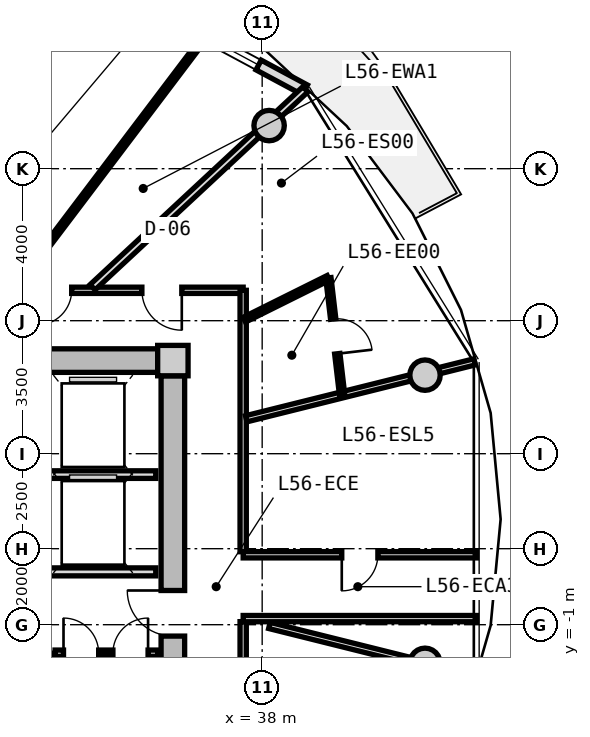
"""IFC4 building model, lengths in metres.
Left out: names, types, materials, properties, quantities, classifications, styles, units other than length and angle.
Written with IfcOpenShell. Run it as: python <this file> out.ifc"""

import sys

from ifc_helpers import new_model, si_unit, direction, frame, frame_2d, origin, origin_2d, place, context, subcontext, project, spatial, rectangle, circle, extrude, source, transform, mapped, element, fill, save


model = new_model("IFC4")
c1 = context("Model", 3, precision=1e-05, world=origin(), true_north=direction((0.0, 1.0)))
c2 = subcontext(c1, "Body", "Model", "MODEL_VIEW")
j1 = project(units=[si_unit("LENGTHUNIT", "METRE"), si_unit("PLANEANGLEUNIT", "RADIAN")], contexts=[c1])
p1 = place(None, origin())
s1 = spatial("IfcSite", under=j1, at=p1, CompositionType="ELEMENT")
p2 = place(p1, origin())
s2 = spatial("IfcBuilding", under=s1, at=p2, CompositionType="ELEMENT")
p3 = place(p2, frame((0.0, 0.0, 180.05)))
s3 = spatial("IfcBuildingStorey", under=s2, at=p3, CompositionType="ELEMENT", Elevation=180.05)
m1 = source(origin(), c2, "Body", "SweptSolid", [
    extrude(rectangle(XDim=0.8, YDim=0.8, at=origin_2d()), origin(), (0.0, 0.0, 1.0), 3.05),
])
p4 = place(p3, frame((35.65, 5.95, 0.0), z_axis=(0.0, 0.0, 1.0), x_axis=(1.0, 0.0, 0.0)))
e1 = element("IfcColumn", 1, at=p4, inside=s3, PredefinedType="COLUMN", context=c2, shape_type="MappedRepresentation", body=[
    mapped(m1, transform((0.0, 0.0, 0.0), x_axis=(1.0, 0.0, 0.0), y_axis=(0.0, 1.0, 0.0), z_axis=(0.0, 0.0, 1.0), scale=1.0)),
])
m2 = source(origin(), c2, "Body", "SweptSolid", [
    extrude(rectangle(XDim=14.5, YDim=0.62, at=frame_2d((7.25, 0.0))), origin(), (0.0, 0.0, 1.0), 2.81),
])
p5 = place(p3, frame((20.75, 5.95, 0.0), z_axis=(0.0, 0.0, 1.0), x_axis=(1.0, 0.0, 0.0)))
e2 = element("IfcWall", 2, at=p5, inside=s3, PredefinedType="SHEAR", context=c2, shape_type="MappedRepresentation", body=[
    mapped(m2, transform((0.0, 0.0, 0.0), x_axis=(1.0, 0.0, 0.0), y_axis=(0.0, 1.0, 0.0), z_axis=(0.0, 0.0, 1.0), scale=1.0)),
])
m3 = source(origin(), c2, "Body", "SweptSolid", [
    extrude(rectangle(XDim=11.1, YDim=0.62, at=frame_2d((5.55, 0.0))), origin(), (0.0, 0.0, 1.0), 2.81),
])
p6 = place(p3, frame((35.65, 5.55, 0.0), z_axis=(0.0, 0.0, 1.0), x_axis=(0.0, -1.0, 0.0)))
e3 = element("IfcWall", 3, at=p6, inside=s3, PredefinedType="SHEAR", context=c2, shape_type="MappedRepresentation", body=[
    mapped(m3, transform((0.0, 0.0, 0.0), x_axis=(1.0, 0.0, 0.0), y_axis=(0.0, 1.0, 0.0), z_axis=(0.0, 0.0, 1.0), scale=1.0)),
])
p7 = place(p6, frame((5.65, 0.0, 0.0)))
e4 = element("IfcOpeningElement", 4, at=p7, cuts=e3, PredefinedType="OPENING", context=c2, shape_type="SweptSolid", body=[
    extrude(rectangle(XDim=1.2, YDim=2.15, at=frame_2d((0.6, 1.075))), frame((0.0, 0.32, 0.0), z_axis=(0.0, -1.0, 0.0), x_axis=(1.0, 0.0, 0.0)), (0.0, 0.0, 1.0), 0.64),
])
m4 = source(origin(), c2, "Body", "SweptSolid", [
    extrude(circle(Radius=0.4, at=origin_2d()), origin(), (0.0, 0.0, 1.0), 3.05),
])
for number, where, z_axis, x_axis in (
    (5, (42.285, 5.567, 0.0), (0.0, 0.0, 1.0), (1.0, 0.0, 0.0)),
    (6, (38.183, 12.135, 0.0), (0.0, 0.0, 1.0), (1.0, 0.0, 0.0)),
    (7, (42.285, -2.016, 0.0), (0.0, 0.0, 1.0), (1.0, 0.0, 0.0)),
):
    element("IfcColumn", number, at=place(p3, frame(where, z_axis=z_axis, x_axis=x_axis)), inside=s3, PredefinedType="COLUMN", context=c2, shape_type="MappedRepresentation", body=[
        mapped(m4, transform((0.0, 0.0, 0.0), x_axis=(1.0, 0.0, 0.0), y_axis=(0.0, 1.0, 0.0), z_axis=(0.0, 0.0, 1.0), scale=1.0)),
    ])
m5 = source(origin(), c2, "Body", "SweptSolid", [
    extrude(rectangle(XDim=8.742, YDim=0.29, at=frame_2d((4.371, 0.0))), origin(), (0.0, 0.0, 1.0), 2.81),
])
p8 = place(p3, frame((31.422, 17.211, 0.0), z_axis=(0.0, 0.0, 1.0), x_axis=(0.880992489116, -0.473130250693, 0.0)))
e8 = element("IfcWall", 8, at=p8, inside=s3, PredefinedType="SOLIDWALL", context=c2, shape_type="MappedRepresentation", body=[
    mapped(m5, transform((0.0, 0.0, 0.0), x_axis=(1.0, 0.0, 0.0), y_axis=(0.0, 1.0, 0.0), z_axis=(0.0, 0.0, 1.0), scale=1.0)),
])
p9 = place(p8, frame((0.9, 0.0, 0.0)))
e9 = element("IfcOpeningElement", 9, at=p9, cuts=e8, PredefinedType="OPENING", context=c2, shape_type="SweptSolid", body=[
    extrude(rectangle(XDim=1.15, YDim=2.25, at=frame_2d((0.575, 1.125))), frame((0.0, 0.155, 0.0), z_axis=(0.0, -1.0, 0.0), x_axis=(1.0, 0.0, 0.0)), (0.0, 0.0, 1.0), 0.31),
])
p10 = place(p8, frame((6.161, 0.0, 0.85)))
e10 = element("IfcOpeningElement", 10, at=p10, cuts=e8, PredefinedType="OPENING", context=c2, shape_type="SweptSolid", body=[
    extrude(rectangle(XDim=1.2, YDim=1.5, at=frame_2d((0.6, 0.75))), frame((0.0, 0.155, 0.0), z_axis=(0.0, -1.0, 0.0), x_axis=(1.0, 0.0, 0.0)), (0.0, 0.0, 1.0), 0.31),
])
m6 = source(origin(), c2, "Body", "SweptSolid", [
    extrude(rectangle(XDim=3.2, YDim=0.2, at=frame_2d((1.6, 0.0))), origin(), (0.0, 0.0, 1.0), 2.795),
])
p11 = place(p3, frame((32.0, 2.95, 0.0), z_axis=(0.0, 0.0, 1.0), x_axis=(1.0, 0.0, 0.0)))
e11 = element("IfcWall", 11, at=p11, inside=s3, PredefinedType="PARTITIONING", context=c2, shape_type="MappedRepresentation", body=[
    mapped(m6, transform((0.0, 0.0, 0.0), x_axis=(1.0, 0.0, 0.0), y_axis=(0.0, 1.0, 0.0), z_axis=(0.0, 0.0, 1.0), scale=1.0)),
])
m7 = source(origin(), c2, "Body", "SweptSolid", [
    extrude(rectangle(XDim=6.66, YDim=0.21, at=frame_2d((3.33, 0.0))), origin(), (0.0, 0.0, 1.0), 2.795),
])
p12 = place(p3, frame((28.54, 0.39, 0.0), z_axis=(0.0, 0.0, 1.0), x_axis=(1.0, 0.0, 0.0)))
e12 = element("IfcWall", 12, at=p12, inside=s3, PredefinedType="PARTITIONING", context=c2, shape_type="MappedRepresentation", body=[
    mapped(m7, transform((0.0, 0.0, 0.0), x_axis=(1.0, 0.0, 0.0), y_axis=(0.0, 1.0, 0.0), z_axis=(0.0, 0.0, 1.0), scale=1.0)),
])
p13 = place(p12, frame((1.0, 0.0, 0.0)))
e13 = element("IfcOpeningElement", 13, at=p13, cuts=e12, PredefinedType="OPENING", context=c2, shape_type="SweptSolid", body=[
    extrude(rectangle(XDim=1.2, YDim=2.15, at=frame_2d((0.6, 1.075))), frame((0.0, 0.115, 0.0), z_axis=(0.0, -1.0, 0.0), x_axis=(1.0, 0.0, 0.0)), (0.0, 0.0, 1.0), 0.23),
])
m8 = source(origin(), c2, "Body", "SweptSolid", [
    extrude(rectangle(XDim=3.8, YDim=0.2, at=frame_2d((1.9, 0.0))), origin(), (0.0, 0.0, 1.0), 2.795),
])
p14 = place(p3, frame((32.55, -5.55, 0.0), z_axis=(0.0, 0.0, 1.0), x_axis=(0.0, 1.0, 0.0)))
e14 = element("IfcWall", 14, at=p14, inside=s3, PredefinedType="PARTITIONING", context=c2, shape_type="MappedRepresentation", body=[
    mapped(m8, transform((0.0, 0.0, 0.0), x_axis=(1.0, 0.0, 0.0), y_axis=(0.0, 1.0, 0.0), z_axis=(0.0, 0.0, 1.0), scale=1.0)),
])
m9 = source(origin(), c2, "Body", "SweptSolid", [
    extrude(rectangle(XDim=2.7, YDim=0.165, at=frame_2d((1.35, 0.0))), origin(), (0.0, 0.0, 1.0), 2.795),
])
p15 = place(p3, frame((32.55, -1.75, 0.0), z_axis=(0.0, 0.0, 1.0), x_axis=(1.0, 0.0, 0.0)))
e15 = element("IfcWall", 15, at=p15, inside=s3, PredefinedType="PARTITIONING", context=c2, shape_type="MappedRepresentation", body=[
    mapped(m9, transform((0.0, 0.0, 0.0), x_axis=(1.0, 0.0, 0.0), y_axis=(0.0, 1.0, 0.0), z_axis=(0.0, 0.0, 1.0), scale=1.0)),
])
p16 = place(p15, frame((0.222, 0.0, 0.0)))
e16 = element("IfcOpeningElement", 16, at=p16, cuts=e15, PredefinedType="OPENING", context=c2, shape_type="SweptSolid", body=[
    extrude(rectangle(XDim=0.925, YDim=2.1, at=frame_2d((0.462, 1.05))), frame((0.0, 0.093, 0.0), z_axis=(0.0, -1.0, 0.0), x_axis=(1.0, 0.0, 0.0)), (0.0, 0.0, 1.0), 0.185),
])
p17 = place(p15, frame((1.522, 0.0, 0.0)))
e17 = element("IfcOpeningElement", 17, at=p17, cuts=e15, PredefinedType="OPENING", context=c2, shape_type="SweptSolid", body=[
    extrude(rectangle(XDim=0.925, YDim=2.1, at=frame_2d((0.462, 1.05))), frame((0.0, 0.093, 0.0), z_axis=(0.0, -1.0, 0.0), x_axis=(1.0, 0.0, 0.0)), (0.0, 0.0, 1.0), 0.185),
])
m10 = source(origin(), c2, "Body", "SweptSolid", [
    extrude(rectangle(XDim=3.8, YDim=0.14, at=frame_2d((1.9, 0.0))), origin(), (0.0, 0.0, 1.0), 2.795),
])
p18 = place(p3, frame((33.9, -5.55, 0.0), z_axis=(0.0, 0.0, 1.0), x_axis=(0.0, 1.0, 0.0)))
e18 = element("IfcWall", 18, at=p18, inside=s3, PredefinedType="PARTITIONING", context=c2, shape_type="MappedRepresentation", body=[
    mapped(m10, transform((0.0, 0.0, 0.0), x_axis=(1.0, 0.0, 0.0), y_axis=(0.0, 1.0, 0.0), z_axis=(0.0, 0.0, 1.0), scale=1.0)),
])
m11 = source(origin(), c2, "Body", "SweptSolid", [
    extrude(rectangle(XDim=8.719, YDim=0.165, at=frame_2d((4.36, 0.0))), origin(), (0.0, 0.0, 1.0), 2.795),
])
p19 = place(p3, frame((28.781, 7.8, 0.0), z_axis=(0.0, 0.0, 1.0), x_axis=(1.0, 0.0, 0.0)))
e19 = element("IfcWall", 19, at=p19, inside=s3, PredefinedType="PARTITIONING", context=c2, shape_type="MappedRepresentation", body=[
    mapped(m11, transform((0.0, 0.0, 0.0), x_axis=(1.0, 0.0, 0.0), y_axis=(0.0, 1.0, 0.0), z_axis=(0.0, 0.0, 1.0), scale=1.0)),
])
p20 = place(p19, frame((6.054, 0.0, 0.0)))
e20 = element("IfcOpeningElement", 20, at=p20, cuts=e19, PredefinedType="OPENING", context=c2, shape_type="SweptSolid", body=[
    extrude(rectangle(XDim=1.05, YDim=2.15, at=frame_2d((0.525, 1.075))), frame((0.0, 0.093, 0.0), z_axis=(0.0, -1.0, 0.0), x_axis=(1.0, 0.0, 0.0)), (0.0, 0.0, 1.0), 0.185),
])
p21 = place(p19, frame((3.287, 0.0, 0.0)))
e21 = element("IfcOpeningElement", 21, at=p21, cuts=e19, PredefinedType="OPENING", context=c2, shape_type="SweptSolid", body=[
    extrude(rectangle(XDim=0.92, YDim=2.1, at=frame_2d((0.46, 1.05))), frame((0.0, 0.093, 0.0), z_axis=(0.0, -1.0, 0.0), x_axis=(1.0, 0.0, 0.0)), (0.0, 0.0, 1.0), 0.185),
])
p22 = place(p19, frame((1.0, 0.0, 0.0)))
e22 = element("IfcOpeningElement", 22, at=p22, cuts=e19, PredefinedType="OPENING", context=c2, shape_type="SweptSolid", body=[
    extrude(rectangle(XDim=0.92, YDim=2.1, at=frame_2d((0.46, 1.05))), frame((0.0, 0.093, 0.0), z_axis=(0.0, -1.0, 0.0), x_axis=(1.0, 0.0, 0.0)), (0.0, 0.0, 1.0), 0.185),
])
m12 = source(origin(), c2, "Body", "SweptSolid", [
    extrude(rectangle(XDim=6.88, YDim=0.165, at=frame_2d((3.44, 0.0))), origin(), (0.0, 0.0, 1.0), 2.795),
])
for number, where, z_axis, x_axis in (
    (23, (37.5, 7.8, 0.0), (0.0, 0.0, 1.0), (0.0, -1.0, 0.0)),
    (24, (37.5, -0.92, 0.0), (0.0, 0.0, 1.0), (0.0, -1.0, 0.0)),
):
    element("IfcWall", number, at=place(p3, frame(where, z_axis=z_axis, x_axis=x_axis)), inside=s3, PredefinedType="PARTITIONING", context=c2, shape_type="MappedRepresentation", body=[
        mapped(m12, transform((0.0, 0.0, 0.0), x_axis=(1.0, 0.0, 0.0), y_axis=(0.0, 1.0, 0.0), z_axis=(0.0, 0.0, 1.0), scale=1.0)),
    ])
m13 = source(origin(), c2, "Body", "SweptSolid", [
    extrude(rectangle(XDim=5.564, YDim=0.165, at=frame_2d((2.782, 0.0))), origin(), (0.0, 0.0, 1.0), 2.345),
])
p23 = place(p3, frame((38.19, -1.02, 0.0), z_axis=(0.0, 0.0, 1.0), x_axis=(0.97031260977, -0.241854169533, 0.0)))
e25 = element("IfcWall", 25, at=p23, inside=s3, PredefinedType="PARTITIONING", context=c2, shape_type="MappedRepresentation", body=[
    mapped(m13, transform((0.0, 0.0, 0.0), x_axis=(1.0, 0.0, 0.0), y_axis=(0.0, 1.0, 0.0), z_axis=(0.0, 0.0, 1.0), scale=1.0)),
])
m14 = source(origin(), c2, "Body", "SweptSolid", [
    extrude(rectangle(XDim=6.193, YDim=0.165, at=frame_2d((3.096, 0.0))), origin(), (0.0, 0.0, 1.0), 2.345),
])
p24 = place(p3, frame((37.58, 4.419, 0.0), z_axis=(0.0, 0.0, 1.0), x_axis=(0.970309243466, 0.241867674657, 0.0)))
e26 = element("IfcWall", 26, at=p24, inside=s3, PredefinedType="PARTITIONING", context=c2, shape_type="MappedRepresentation", body=[
    mapped(m14, transform((0.0, 0.0, 0.0), x_axis=(1.0, 0.0, 0.0), y_axis=(0.0, 1.0, 0.0), z_axis=(0.0, 0.0, 1.0), scale=1.0)),
])
m15 = source(origin(), c2, "Body", "SweptSolid", [
    extrude(rectangle(XDim=6.139, YDim=0.165, at=frame_2d((3.069, 0.0))), origin(), (0.0, 0.0, 1.0), 2.795),
])
p25 = place(p3, frame((37.5, 0.84, 0.0), z_axis=(0.0, 0.0, 1.0), x_axis=(1.0, 0.0, 0.0)))
e27 = element("IfcWall", 27, at=p25, inside=s3, PredefinedType="PARTITIONING", context=c2, shape_type="MappedRepresentation", body=[
    mapped(m15, transform((0.0, 0.0, 0.0), x_axis=(1.0, 0.0, 0.0), y_axis=(0.0, 1.0, 0.0), z_axis=(0.0, 0.0, 1.0), scale=1.0)),
])
p26 = place(p25, frame((2.594, 0.0, 0.0)))
e28 = element("IfcOpeningElement", 28, at=p26, cuts=e27, PredefinedType="OPENING", context=c2, shape_type="SweptSolid", body=[
    extrude(rectangle(XDim=0.95, YDim=2.1, at=frame_2d((0.475, 1.05))), frame((0.0, 0.093, 0.0), z_axis=(0.0, -1.0, 0.0), x_axis=(1.0, 0.0, 0.0)), (0.0, 0.0, 1.0), 0.185),
])
p27 = place(p3, frame((43.639, -0.84, 0.0), z_axis=(0.0, 0.0, 1.0), x_axis=(-1.0, 0.0, 0.0)))
e29 = element("IfcWall", 29, at=p27, inside=s3, PredefinedType="PARTITIONING", context=c2, shape_type="MappedRepresentation", body=[
    mapped(m15, transform((0.0, 0.0, 0.0), x_axis=(1.0, 0.0, 0.0), y_axis=(0.0, 1.0, 0.0), z_axis=(0.0, 0.0, 1.0), scale=1.0)),
])
m16 = source(origin(), c2, "Body", "SweptSolid", [
    extrude(rectangle(XDim=7.648, YDim=0.19, at=frame_2d((3.824, 0.0))), origin(), (0.0, 0.0, 1.0), 2.345),
])
p28 = place(p3, frame((33.538, 7.88, 0.0), z_axis=(0.0, 0.0, 1.0), x_axis=(0.732167856666, 0.681124239522, 0.0)))
e30 = element("IfcWall", 30, at=p28, inside=s3, PredefinedType="PARTITIONING", context=c2, shape_type="MappedRepresentation", body=[
    mapped(m16, transform((0.0, 0.0, 0.0), x_axis=(1.0, 0.0, 0.0), y_axis=(0.0, 1.0, 0.0), z_axis=(0.0, 0.0, 1.0), scale=1.0)),
])
m17 = source(origin(), c2, "Body", "SweptSolid", [
    extrude(rectangle(XDim=2.471, YDim=0.14, at=frame_2d((1.235, 0.0))), origin(), (0.0, 0.0, 1.0), 2.795),
])
p29 = place(p3, frame((37.53, 7.026, 0.0), z_axis=(0.0, 0.0, 1.0), x_axis=(0.895295102372, 0.445473545419, 0.0)))
e31 = element("IfcWall", 31, at=p29, inside=s3, PredefinedType="PARTITIONING", context=c2, shape_type="MappedRepresentation", body=[
    mapped(m17, transform((0.0, 0.0, 0.0), x_axis=(1.0, 0.0, 0.0), y_axis=(0.0, 1.0, 0.0), z_axis=(0.0, 0.0, 1.0), scale=1.0)),
])
m18 = source(origin(), c2, "Body", "SweptSolid", [
    extrude(rectangle(XDim=3.101, YDim=0.14, at=frame_2d((1.551, 0.0))), origin(), (0.0, 0.0, 1.0), 2.795),
])
p30 = place(p3, frame((39.742, 8.127, 0.0), z_axis=(0.0, 0.0, 1.0), x_axis=(0.116754457614, -0.993160811061, 0.0)))
e32 = element("IfcWall", 32, at=p30, inside=s3, PredefinedType="PARTITIONING", context=c2, shape_type="MappedRepresentation", body=[
    mapped(m18, transform((0.0, 0.0, 0.0), x_axis=(1.0, 0.0, 0.0), y_axis=(0.0, 1.0, 0.0), z_axis=(0.0, 0.0, 1.0), scale=1.0)),
])
p31 = place(p30, frame((1.09, 0.0, 0.0)))
e33 = element("IfcOpeningElement", 33, at=p31, cuts=e32, PredefinedType="OPENING", context=c2, shape_type="SweptSolid", body=[
    extrude(rectangle(XDim=0.92, YDim=2.1, at=frame_2d((0.46, 1.05))), frame((0.0, 0.08, 0.0), z_axis=(0.0, -1.0, 0.0), x_axis=(1.0, 0.0, 0.0)), (0.0, 0.0, 1.0), 0.16),
])
m19 = source(origin(), c2, "Body", "SweptSolid", [
    extrude(rectangle(XDim=8.359, YDim=0.14, at=frame_2d((4.18, 0.0))), origin(), (0.0, 0.0, 1.0), 2.795),
])
p32 = place(p3, frame((31.473, 7.83, 0.0), z_axis=(0.0, 0.0, 1.0), x_axis=(0.603265985309, 0.797540062297, 0.0)))
e34 = element("IfcWall", 34, at=p32, inside=s3, PredefinedType="PARTITIONING", context=c2, shape_type="MappedRepresentation", body=[
    mapped(m19, transform((0.0, 0.0, 0.0), x_axis=(1.0, 0.0, 0.0), y_axis=(0.0, 1.0, 0.0), z_axis=(0.0, 0.0, 1.0), scale=1.0)),
])
m20 = source(origin(), c2, "Body", "SweptSolid", [
    extrude(rectangle(XDim=1.2, YDim=1.5, at=frame_2d((0.6, 0.75))), frame((0.0, 0.03, 0.0), z_axis=(0.0, -1.0, 0.0), x_axis=(1.0, 0.0, 0.0)), (0.0, 0.0, 1.0), 0.06),
])
p33 = place(p10, origin())
e35 = element("IfcWindow", 35, at=p33, inside=s3, PartitioningType="SINGLE_PANEL", PredefinedType="WINDOW", context=c2, shape_type="MappedRepresentation", body=[
    mapped(m20, transform((0.0, 0.0, 0.0), x_axis=(1.0, 0.0, 0.0), y_axis=(0.0, 1.0, 0.0), z_axis=(0.0, 0.0, 1.0), scale=1.0)),
])
fill(e10, e35)
m21 = source(origin(), c2, "Body", "SweptSolid", [
    extrude(rectangle(XDim=1.2, YDim=2.15, at=frame_2d((0.6, 1.075))), frame((0.0, 0.025, 0.0), z_axis=(0.0, -1.0, 0.0), x_axis=(1.0, 0.0, 0.0)), (0.0, 0.0, 1.0), 0.05),
])
p34 = place(p7, frame((1.2, 0.0, 0.0), z_axis=(0.0, 0.0, 1.0), x_axis=(-1.0, 0.0, 0.0)))
e36 = element("IfcDoor", 36, at=p34, inside=s3, OperationType="SINGLE_SWING_RIGHT", PredefinedType="DOOR", context=c2, shape_type="MappedRepresentation", body=[
    mapped(m21, transform((0.0, 0.0, 0.0), x_axis=(1.0, 0.0, 0.0), y_axis=(0.0, 1.0, 0.0), z_axis=(0.0, 0.0, 1.0), scale=1.0)),
])
fill(e4, e36)
m22 = source(origin(), c2, "Body", "SweptSolid", [
    extrude(rectangle(XDim=0.925, YDim=2.1, at=frame_2d((0.462, 1.05))), frame((0.0, 0.025, 0.0), z_axis=(0.0, -1.0, 0.0), x_axis=(1.0, 0.0, 0.0)), (0.0, 0.0, 1.0), 0.05),
])
p35 = place(p16, origin())
e37 = element("IfcDoor", 37, at=p35, inside=s3, OperationType="SINGLE_SWING_LEFT", PredefinedType="DOOR", context=c2, shape_type="MappedRepresentation", body=[
    mapped(m22, transform((0.0, 0.0, 0.0), x_axis=(1.0, 0.0, 0.0), y_axis=(0.0, 1.0, 0.0), z_axis=(0.0, 0.0, 1.0), scale=1.0)),
])
fill(e16, e37)
p36 = place(p17, origin())
e38 = element("IfcDoor", 38, at=p36, inside=s3, OperationType="SINGLE_SWING_RIGHT", PredefinedType="DOOR", context=c2, shape_type="MappedRepresentation", body=[
    mapped(m22, transform((0.0, 0.0, 0.0), x_axis=(1.0, 0.0, 0.0), y_axis=(0.0, 1.0, 0.0), z_axis=(0.0, 0.0, 1.0), scale=1.0)),
])
fill(e17, e38)
m23 = source(origin(), c2, "Body", "SweptSolid", [
    extrude(rectangle(XDim=0.95, YDim=2.1, at=frame_2d((0.475, 1.05))), frame((0.0, 0.025, 0.0), z_axis=(0.0, -1.0, 0.0), x_axis=(1.0, 0.0, 0.0)), (0.0, 0.0, 1.0), 0.05),
])
p37 = place(p26, frame((0.95, 0.0, 0.0), z_axis=(0.0, 0.0, 1.0), x_axis=(-1.0, 0.0, 0.0)))
e39 = element("IfcDoor", 39, at=p37, inside=s3, OperationType="SINGLE_SWING_RIGHT", PredefinedType="DOOR", context=c2, shape_type="MappedRepresentation", body=[
    mapped(m23, transform((0.0, 0.0, 0.0), x_axis=(1.0, 0.0, 0.0), y_axis=(0.0, 1.0, 0.0), z_axis=(0.0, 0.0, 1.0), scale=1.0)),
])
fill(e28, e39)
m24 = source(origin(), c2, "Body", "SweptSolid", [
    extrude(rectangle(XDim=1.05, YDim=2.15, at=frame_2d((0.525, 1.075))), frame((0.0, 0.025, 0.0), z_axis=(0.0, -1.0, 0.0), x_axis=(1.0, 0.0, 0.0)), (0.0, 0.0, 1.0), 0.05),
])
p38 = place(p20, frame((1.05, 0.0, 0.0), z_axis=(0.0, 0.0, 1.0), x_axis=(-1.0, 0.0, 0.0)))
e40 = element("IfcDoor", 40, at=p38, inside=s3, OperationType="SINGLE_SWING_LEFT", PredefinedType="DOOR", context=c2, shape_type="MappedRepresentation", body=[
    mapped(m24, transform((0.0, 0.0, 0.0), x_axis=(1.0, 0.0, 0.0), y_axis=(0.0, 1.0, 0.0), z_axis=(0.0, 0.0, 1.0), scale=1.0)),
])
fill(e20, e40)
m25 = source(origin(), c2, "Body", "SweptSolid", [
    extrude(rectangle(XDim=0.92, YDim=2.1, at=frame_2d((0.46, 1.05))), frame((0.0, 0.025, 0.0), z_axis=(0.0, -1.0, 0.0), x_axis=(1.0, 0.0, 0.0)), (0.0, 0.0, 1.0), 0.05),
])
p39 = place(p31, origin())
e41 = element("IfcDoor", 41, at=p39, inside=s3, OperationType="SINGLE_SWING_RIGHT", PredefinedType="DOOR", context=c2, shape_type="MappedRepresentation", body=[
    mapped(m25, transform((0.0, 0.0, 0.0), x_axis=(1.0, 0.0, 0.0), y_axis=(0.0, 1.0, 0.0), z_axis=(0.0, 0.0, 1.0), scale=1.0)),
])
fill(e33, e41)
p40 = place(p21, frame((0.92, 0.0, 0.0), z_axis=(0.0, 0.0, 1.0), x_axis=(-1.0, 0.0, 0.0)))
e42 = element("IfcDoor", 42, at=p40, inside=s3, OperationType="SINGLE_SWING_RIGHT", PredefinedType="DOOR", context=c2, shape_type="MappedRepresentation", body=[
    mapped(m25, transform((0.0, 0.0, 0.0), x_axis=(1.0, 0.0, 0.0), y_axis=(0.0, 1.0, 0.0), z_axis=(0.0, 0.0, 1.0), scale=1.0)),
])
fill(e21, e42)
save(model, sys.argv[1])
